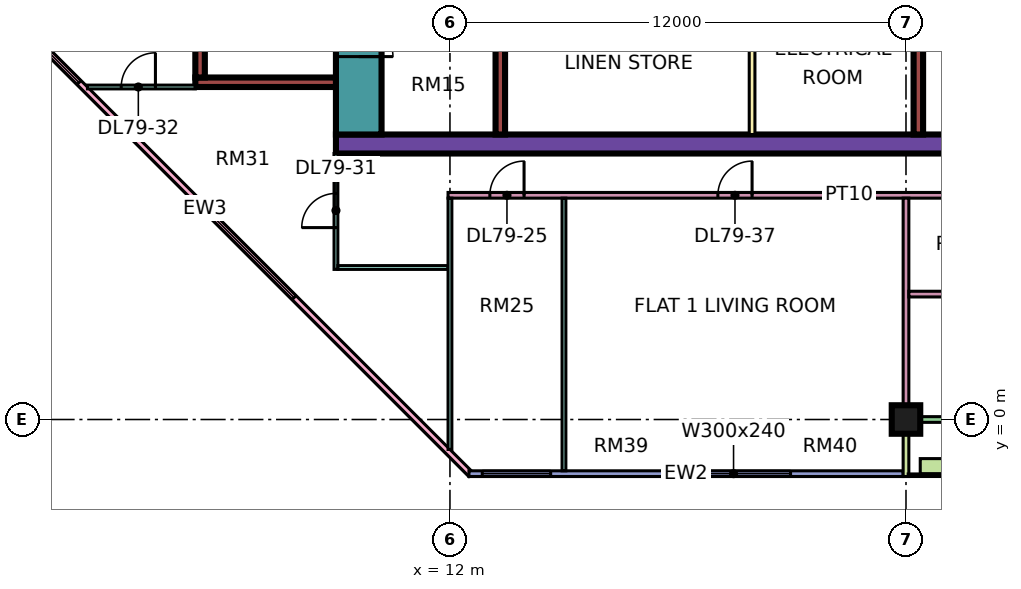
"""IFC4 building model, lengths in metres.
Left out: names, types, materials, properties, quantities, classifications, styles, units other than length and angle.
Written with IfcOpenShell. Run it as: python <this file> out.ifc"""

import sys

from ifc_helpers import new_model, si_unit, direction, frame, frame_2d, origin, origin_2d, place, context, subcontext, project, spatial, rectangle, extrude, element, fill, save


model = new_model("IFC4")
c1 = context("Model", 3, precision=1e-05, world=origin(), true_north=direction((0.0, 1.0)))
c2 = subcontext(c1, "Body", "Model", "MODEL_VIEW")
j1 = project(units=[si_unit("LENGTHUNIT", "METRE"), si_unit("PLANEANGLEUNIT", "RADIAN")], contexts=[c1])
p1 = place(None, origin())
s1 = spatial("IfcSite", under=j1, at=p1, CompositionType="ELEMENT")
p2 = place(p1, origin())
s2 = spatial("IfcBuilding", under=s1, at=p2, CompositionType="ELEMENT")
p3 = place(p2, frame((0.0, 0.0, 342.65)))
s3 = spatial("IfcBuildingStorey", under=s2, at=p3, CompositionType="ELEMENT", Elevation=342.65)
p4 = place(p3, frame((24.0, 0.0, 0.0), z_axis=(0.0, 0.0, 1.0), x_axis=(1.0, 0.0, 0.0)))
e1 = element("IfcColumn", 1, at=p4, inside=s3, PredefinedType="COLUMN", context=c2, shape_type="SweptSolid", body=[
    extrude(rectangle(XDim=0.75, YDim=0.75, at=origin_2d()), origin(), (0.0, 0.0, 1.0), 3.75),
])
p5 = place(p3, frame((9.0, 7.25, 0.0), z_axis=(0.0, 0.0, 1.0), x_axis=(1.0, 0.0, 0.0)))
e2 = element("IfcWall", 2, at=p5, inside=s3, PredefinedType="SHEAR", context=c2, shape_type="SweptSolid", body=[
    extrude(rectangle(XDim=25.0, YDim=0.5, at=frame_2d((12.5, 0.0))), origin(), (0.0, 0.0, 1.0), 3.75),
])
p6 = place(p3, frame((9.6, 7.5, 0.0), z_axis=(0.0, 0.0, 1.0), x_axis=(0.0, 1.0, 0.0)))
e3 = element("IfcWall", 3, at=p6, inside=s3, PredefinedType="SHEAR", context=c2, shape_type="SweptSolid", body=[
    extrude(rectangle(XDim=12.0, YDim=1.2, at=frame_2d((6.0, 0.0))), origin(), (0.0, 0.0, 1.0), 3.75),
])
p7 = place(p6, frame((4.375, 0.0, 0.0)))
e4 = element("IfcOpeningElement", 4, at=p7, cuts=e3, PredefinedType="OPENING", context=c2, shape_type="SweptSolid", body=[
    extrude(rectangle(XDim=1.1, YDim=2.2, at=frame_2d((0.55, 1.1))), frame((0.0, 0.61, 0.0), z_axis=(0.0, -1.0, 0.0), x_axis=(1.0, 0.0, 0.0)), (0.0, 0.0, 1.0), 1.22),
])
p8 = place(p6, frame((6.875, 0.0, 0.0)))
e5 = element("IfcOpeningElement", 5, at=p8, cuts=e3, PredefinedType="OPENING", context=c2, shape_type="SweptSolid", body=[
    extrude(rectangle(XDim=1.1, YDim=2.2, at=frame_2d((0.55, 1.1))), frame((0.0, 0.61, 0.0), z_axis=(0.0, -1.0, 0.0), x_axis=(1.0, 0.0, 0.0)), (0.0, 0.0, 1.0), 1.22),
])
p9 = place(p6, frame((9.85, 0.0, 0.0)))
e6 = element("IfcOpeningElement", 6, at=p9, cuts=e3, PredefinedType="OPENING", context=c2, shape_type="SweptSolid", body=[
    extrude(rectangle(XDim=1.1, YDim=2.2, at=frame_2d((0.55, 1.1))), frame((0.0, 0.61, 0.0), z_axis=(0.0, -1.0, 0.0), x_axis=(1.0, 0.0, 0.0)), (0.0, 0.0, 1.0), 1.22),
])
p10 = place(p6, frame((2.05, 0.0, 0.0)))
e7 = element("IfcOpeningElement", 7, at=p10, cuts=e3, PredefinedType="OPENING", context=c2, shape_type="SweptSolid", body=[
    extrude(rectangle(XDim=0.9, YDim=2.1, at=frame_2d((0.45, 1.05))), frame((0.0, 0.61, 0.0), z_axis=(0.0, -1.0, 0.0), x_axis=(1.0, 0.0, 0.0)), (0.0, 0.0, 1.0), 1.22),
])
p11 = place(p3, frame((13.325, 7.5, 0.0), z_axis=(0.0, 0.0, 1.0), x_axis=(0.0, 1.0, 0.0)))
e8 = element("IfcWall", 8, at=p11, inside=s3, PredefinedType="SHEAR", context=c2, shape_type="SweptSolid", body=[
    extrude(rectangle(XDim=12.0, YDim=0.25, at=frame_2d((6.0, 0.0))), origin(), (0.0, 0.0, 1.0), 3.75),
])
for number, where, z_axis, x_axis in (
    (9, (24.325, 7.5, 0.0), (0.0, 0.0, 1.0), (0.0, 1.0, 0.0)),
    (10, (5.3, 8.875, 0.0), (0.0, 0.0, 1.0), (1.0, 0.0, 0.0)),
):
    element("IfcWall", number, at=place(p3, frame(where, z_axis=z_axis, x_axis=x_axis)), inside=s3, PredefinedType="SHEAR", context=c2, shape_type="SweptSolid", body=[
        extrude(rectangle(XDim=3.7, YDim=0.25, at=frame_2d((1.85, 0.0))), origin(), (0.0, 0.0, 1.0), 3.75),
    ])
p12 = place(p3, frame((5.425, 9.0, 0.0), z_axis=(0.0, 0.0, 1.0), x_axis=(0.0, 1.0, 0.0)))
e11 = element("IfcWall", 11, at=p12, inside=s3, PredefinedType="SHEAR", context=c2, shape_type="SweptSolid", body=[
    extrude(rectangle(XDim=4.0, YDim=0.25, at=frame_2d((2.0, 0.0))), origin(), (0.0, 0.0, 1.0), 3.75),
])
p13 = place(p3, frame((-1.447, 12.553, 0.0), z_axis=(0.0, 0.0, 1.0), x_axis=(0.707106781187, -0.707106781187, 0.0)))
e12 = element("IfcWall", 12, at=p13, inside=s3, PredefinedType="SOLIDWALL", context=c2, shape_type="SweptSolid", body=[
    extrude(rectangle(XDim=19.799, YDim=0.15, at=frame_2d((9.899, 0.0))), origin(), (0.0, 0.0, 1.0), 3.35),
])
p14 = place(p13, frame((2.212, 0.0, 0.45)))
e13 = element("IfcOpeningElement", 13, at=p14, cuts=e12, PredefinedType="OPENING", context=c2, shape_type="SweptSolid", body=[
    extrude(rectangle(XDim=3.0, YDim=2.4, at=frame_2d((1.5, 1.2))), frame((0.0, 0.085, 0.0), z_axis=(0.0, -1.0, 0.0), x_axis=(1.0, 0.0, 0.0)), (0.0, 0.0, 1.0), 0.17),
])
p15 = place(p13, frame((10.216, 0.0, 0.45)))
e14 = element("IfcOpeningElement", 14, at=p15, cuts=e12, PredefinedType="OPENING", context=c2, shape_type="SweptSolid", body=[
    extrude(rectangle(XDim=3.0, YDim=2.4, at=frame_2d((1.5, 1.2))), frame((0.0, 0.085, 0.0), z_axis=(0.0, -1.0, 0.0), x_axis=(1.0, 0.0, 0.0)), (0.0, 0.0, 1.0), 0.17),
])
p16 = place(p3, frame((12.5, -1.425, 0.0), z_axis=(0.0, 0.0, 1.0), x_axis=(1.0, 0.0, 0.0)))
e15 = element("IfcWall", 15, at=p16, inside=s3, PredefinedType="SOLIDWALL", context=c2, shape_type="SweptSolid", body=[
    extrude(rectangle(XDim=11.425, YDim=0.15, at=frame_2d((5.712, 0.0))), origin(), (0.0, 0.0, 1.0), 3.35),
])
p17 = place(p16, frame((0.35, 0.0, 0.45)))
e16 = element("IfcOpeningElement", 16, at=p17, cuts=e15, PredefinedType="OPENING", context=c2, shape_type="SweptSolid", body=[
    extrude(rectangle(XDim=1.8, YDim=2.4, at=frame_2d((0.9, 1.2))), frame((0.0, 0.085, 0.0), z_axis=(0.0, -1.0, 0.0), x_axis=(1.0, 0.0, 0.0)), (0.0, 0.0, 1.0), 0.17),
])
p18 = place(p16, frame((5.462, 0.0, 0.45)))
e17 = element("IfcOpeningElement", 17, at=p18, cuts=e15, PredefinedType="OPENING", context=c2, shape_type="SweptSolid", body=[
    extrude(rectangle(XDim=3.0, YDim=2.4, at=frame_2d((1.5, 1.2))), frame((0.0, 0.085, 0.0), z_axis=(0.0, -1.0, 0.0), x_axis=(1.0, 0.0, 0.0)), (0.0, 0.0, 1.0), 0.17),
])
p19 = place(p3, frame((24.075, 0.0, 0.0), z_axis=(0.0, 0.0, 1.0), x_axis=(1.0, 0.0, 0.0)))
e18 = element("IfcWall", 18, at=p19, inside=s3, PredefinedType="SOLIDWALL", context=c2, shape_type="SweptSolid", body=[
    extrude(rectangle(XDim=11.85, YDim=0.15, at=frame_2d((5.925, 0.0))), origin(), (0.0, 0.0, 1.0), 3.35),
])
p20 = place(p19, frame((2.262, 0.0, 0.0)))
e19 = element("IfcOpeningElement", 19, at=p20, cuts=e18, PredefinedType="OPENING", context=c2, shape_type="SweptSolid", body=[
    extrude(rectangle(XDim=1.8, YDim=2.4, at=frame_2d((0.9, 1.2))), frame((0.0, 0.085, 0.0), z_axis=(0.0, -1.0, 0.0), x_axis=(1.0, 0.0, 0.0)), (0.0, 0.0, 1.0), 0.17),
])
p21 = place(p19, frame((6.525, 0.0, 0.45)))
e20 = element("IfcOpeningElement", 20, at=p21, cuts=e18, PredefinedType="OPENING", context=c2, shape_type="SweptSolid", body=[
    extrude(rectangle(XDim=1.8, YDim=2.4, at=frame_2d((0.9, 1.2))), frame((0.0, 0.085, 0.0), z_axis=(0.0, -1.0, 0.0), x_axis=(1.0, 0.0, 0.0)), (0.0, 0.0, 1.0), 0.17),
])
p22 = place(p19, frame((9.288, 0.0, 0.45)))
e21 = element("IfcOpeningElement", 21, at=p22, cuts=e18, PredefinedType="OPENING", context=c2, shape_type="SweptSolid", body=[
    extrude(rectangle(XDim=1.8, YDim=2.4, at=frame_2d((0.9, 1.2))), frame((0.0, 0.085, 0.0), z_axis=(0.0, -1.0, 0.0), x_axis=(1.0, 0.0, 0.0)), (0.0, 0.0, 1.0), 0.17),
])
p23 = place(p3, frame((24.0, -1.5, 0.0), z_axis=(0.0, 0.0, 1.0), x_axis=(0.0, 1.0, 0.0)))
e22 = element("IfcWall", 22, at=p23, inside=s3, PredefinedType="SOLIDWALL", context=c2, shape_type="SweptSolid", body=[
    extrude(rectangle(XDim=1.5, YDim=0.15, at=frame_2d((0.75, 0.0))), origin(), (0.0, 0.0, 1.0), 3.35),
])
p24 = place(p3, frame((24.375, -1.229, 0.0), z_axis=(0.0, 0.0, 1.0), x_axis=(1.0, 0.0, 0.0)))
e23 = element("IfcWall", 23, at=p24, inside=s3, PredefinedType="SOLIDWALL", context=c2, shape_type="SweptSolid", body=[
    extrude(rectangle(XDim=11.25, YDim=0.4, at=frame_2d((5.625, 0.0))), origin(), (0.0, 0.0, 1.0), 0.7),
])
p25 = place(p3, frame((19.95, 7.5, 0.0), z_axis=(0.0, 0.0, 1.0), x_axis=(0.0, 1.0, 0.0)))
e24 = element("IfcWall", 24, at=p25, inside=s3, PredefinedType="PARTITIONING", context=c2, shape_type="SweptSolid", body=[
    extrude(rectangle(XDim=3.7, YDim=0.15, at=frame_2d((1.85, 0.0))), origin(), (0.0, 0.0, 1.0), 3.35),
])
p26 = place(p3, frame((2.461, 8.75, 0.0), z_axis=(0.0, 0.0, 1.0), x_axis=(1.0, 0.0, 0.0)))
e25 = element("IfcWall", 25, at=p26, inside=s3, PredefinedType="PARTITIONING", context=c2, shape_type="SweptSolid", body=[
    extrude(rectangle(XDim=2.839, YDim=0.1, at=frame_2d((1.419, 0.0))), origin(), (0.0, 0.0, 1.0), 3.35),
])
p27 = place(p26, frame((0.889, 0.0, 0.0)))
e26 = element("IfcOpeningElement", 26, at=p27, cuts=e25, PredefinedType="OPENING", context=c2, shape_type="SweptSolid", body=[
    extrude(rectangle(XDim=0.9, YDim=2.1, at=frame_2d((0.45, 1.05))), frame((0.0, 0.06, 0.0), z_axis=(0.0, -1.0, 0.0), x_axis=(1.0, 0.0, 0.0)), (0.0, 0.0, 1.0), 0.12),
])
p28 = place(p3, frame((9.0, 3.95, 0.0), z_axis=(0.0, 0.0, 1.0), x_axis=(0.0, 1.0, 0.0)))
e27 = element("IfcWall", 27, at=p28, inside=s3, PredefinedType="PARTITIONING", context=c2, shape_type="SweptSolid", body=[
    extrude(rectangle(XDim=3.05, YDim=0.1, at=frame_2d((1.525, 0.0))), origin(), (0.0, 0.0, 1.0), 3.35),
])
p29 = place(p28, frame((1.1, 0.0, 0.0)))
e28 = element("IfcOpeningElement", 28, at=p29, cuts=e27, PredefinedType="OPENING", context=c2, shape_type="SweptSolid", body=[
    extrude(rectangle(XDim=0.9, YDim=2.1, at=frame_2d((0.45, 1.05))), frame((0.0, 0.06, 0.0), z_axis=(0.0, -1.0, 0.0), x_axis=(1.0, 0.0, 0.0)), (0.0, 0.0, 1.0), 0.12),
])
p30 = place(p3, frame((9.05, 4.0, 0.0), z_axis=(0.0, 0.0, 1.0), x_axis=(1.0, 0.0, 0.0)))
e29 = element("IfcWall", 29, at=p30, inside=s3, PredefinedType="PARTITIONING", context=c2, shape_type="SweptSolid", body=[
    extrude(rectangle(XDim=2.9, YDim=0.1, at=frame_2d((1.45, 0.0))), origin(), (0.0, 0.0, 1.0), 3.35),
])
p31 = place(p3, frame((11.95, 5.9, 0.0), z_axis=(0.0, 0.0, 1.0), x_axis=(1.0, 0.0, 0.0)))
e30 = element("IfcWall", 30, at=p31, inside=s3, PredefinedType="PARTITIONING", context=c2, shape_type="SweptSolid", body=[
    extrude(rectangle(XDim=21.1, YDim=0.15, at=frame_2d((10.55, 0.0))), origin(), (0.0, 0.0, 1.0), 3.35),
])
p32 = place(p31, frame((1.1, 0.0, 0.0)))
e31 = element("IfcOpeningElement", 31, at=p32, cuts=e30, PredefinedType="OPENING", context=c2, shape_type="SweptSolid", body=[
    extrude(rectangle(XDim=0.9, YDim=2.1, at=frame_2d((0.45, 1.05))), frame((0.0, 0.085, 0.0), z_axis=(0.0, -1.0, 0.0), x_axis=(1.0, 0.0, 0.0)), (0.0, 0.0, 1.0), 0.17),
])
p33 = place(p31, frame((16.1, 0.0, 0.0)))
e32 = element("IfcOpeningElement", 32, at=p33, cuts=e30, PredefinedType="OPENING", context=c2, shape_type="SweptSolid", body=[
    extrude(rectangle(XDim=0.9, YDim=2.1, at=frame_2d((0.45, 1.05))), frame((0.0, 0.085, 0.0), z_axis=(0.0, -1.0, 0.0), x_axis=(1.0, 0.0, 0.0)), (0.0, 0.0, 1.0), 0.17),
])
p34 = place(p31, frame((7.1, 0.0, 0.0)))
e33 = element("IfcOpeningElement", 33, at=p34, cuts=e30, PredefinedType="OPENING", context=c2, shape_type="SweptSolid", body=[
    extrude(rectangle(XDim=0.9, YDim=2.1, at=frame_2d((0.45, 1.05))), frame((0.0, 0.085, 0.0), z_axis=(0.0, -1.0, 0.0), x_axis=(1.0, 0.0, 0.0)), (0.0, 0.0, 1.0), 0.17),
])
p35 = place(p3, frame((12.0, -0.788, 0.0), z_axis=(0.0, 0.0, 1.0), x_axis=(0.0, 1.0, 0.0)))
e34 = element("IfcWall", 34, at=p35, inside=s3, PredefinedType="PARTITIONING", context=c2, shape_type="SweptSolid", body=[
    extrude(rectangle(XDim=6.613, YDim=0.1, at=frame_2d((3.306, 0.0))), origin(), (0.0, 0.0, 1.0), 3.35),
])
p36 = place(p3, frame((15.0, -1.35, 0.0), z_axis=(0.0, 0.0, 1.0), x_axis=(0.0, 1.0, 0.0)))
e35 = element("IfcWall", 35, at=p36, inside=s3, PredefinedType="PARTITIONING", context=c2, shape_type="SweptSolid", body=[
    extrude(rectangle(XDim=7.175, YDim=0.1, at=frame_2d((3.587, 0.0))), origin(), (0.0, 0.0, 1.0), 3.35),
])
p37 = place(p3, frame((24.0, 0.0, 0.0), z_axis=(0.0, 0.0, 1.0), x_axis=(0.0, 1.0, 0.0)))
e36 = element("IfcWall", 36, at=p37, inside=s3, PredefinedType="PARTITIONING", context=c2, shape_type="SweptSolid", body=[
    extrude(rectangle(XDim=5.825, YDim=0.15, at=frame_2d((2.913, 0.0))), origin(), (0.0, 0.0, 1.0), 3.35),
])
p38 = place(p3, frame((24.075, 3.3, 0.0), z_axis=(0.0, 0.0, 1.0), x_axis=(1.0, 0.0, 0.0)))
e37 = element("IfcWall", 37, at=p38, inside=s3, PredefinedType="PARTITIONING", context=c2, shape_type="SweptSolid", body=[
    extrude(rectangle(XDim=3.0, YDim=0.15, at=frame_2d((1.5, 0.0))), origin(), (0.0, 0.0, 1.0), 3.35),
])
p39 = place(p14, origin())
e38 = element("IfcWindow", 38, at=p39, inside=s3, PartitioningType="SINGLE_PANEL", PredefinedType="WINDOW", context=c2, shape_type="SweptSolid", body=[
    extrude(rectangle(XDim=3.0, YDim=2.4, at=frame_2d((1.5, 1.2))), frame((0.0, 0.03, 0.0), z_axis=(0.0, -1.0, 0.0), x_axis=(1.0, 0.0, 0.0)), (0.0, 0.0, 1.0), 0.06),
])
fill(e13, e38)
p40 = place(p15, origin())
e39 = element("IfcWindow", 39, at=p40, inside=s3, PartitioningType="SINGLE_PANEL", PredefinedType="WINDOW", context=c2, shape_type="SweptSolid", body=[
    extrude(rectangle(XDim=3.0, YDim=2.4, at=frame_2d((1.5, 1.2))), frame((0.0, 0.03, 0.0), z_axis=(0.0, -1.0, 0.0), x_axis=(1.0, 0.0, 0.0)), (0.0, 0.0, 1.0), 0.06),
])
fill(e14, e39)
p41 = place(p17, origin())
e40 = element("IfcWindow", 40, at=p41, inside=s3, PartitioningType="SINGLE_PANEL", PredefinedType="WINDOW", context=c2, shape_type="SweptSolid", body=[
    extrude(rectangle(XDim=1.8, YDim=2.4, at=frame_2d((0.9, 1.2))), frame((0.0, 0.03, 0.0), z_axis=(0.0, -1.0, 0.0), x_axis=(1.0, 0.0, 0.0)), (0.0, 0.0, 1.0), 0.06),
])
fill(e16, e40)
p42 = place(p18, origin())
e41 = element("IfcWindow", 41, at=p42, inside=s3, PartitioningType="SINGLE_PANEL", PredefinedType="WINDOW", context=c2, shape_type="SweptSolid", body=[
    extrude(rectangle(XDim=3.0, YDim=2.4, at=frame_2d((1.5, 1.2))), frame((0.0, 0.03, 0.0), z_axis=(0.0, -1.0, 0.0), x_axis=(1.0, 0.0, 0.0)), (0.0, 0.0, 1.0), 0.06),
])
fill(e17, e41)
p43 = place(p10, frame((0.9, 0.0, 0.0), z_axis=(0.0, 0.0, 1.0), x_axis=(-1.0, 0.0, 0.0)))
e42 = element("IfcDoor", 42, at=p43, inside=s3, OperationType="SINGLE_SWING_LEFT", PredefinedType="DOOR", context=c2, shape_type="SweptSolid", body=[
    extrude(rectangle(XDim=0.9, YDim=2.1, at=frame_2d((0.45, 1.05))), frame((0.0, 0.025, 0.0), z_axis=(0.0, -1.0, 0.0), x_axis=(1.0, 0.0, 0.0)), (0.0, 0.0, 1.0), 0.05),
])
fill(e7, e42)
p44 = place(p32, frame((0.9, 0.0, 0.0), z_axis=(0.0, 0.0, 1.0), x_axis=(-1.0, 0.0, 0.0)))
e43 = element("IfcDoor", 43, at=p44, inside=s3, OperationType="SINGLE_SWING_RIGHT", PredefinedType="DOOR", context=c2, shape_type="SweptSolid", body=[
    extrude(rectangle(XDim=0.9, YDim=2.1, at=frame_2d((0.45, 1.05))), frame((0.0, 0.025, 0.0), z_axis=(0.0, -1.0, 0.0), x_axis=(1.0, 0.0, 0.0)), (0.0, 0.0, 1.0), 0.05),
])
fill(e31, e43)
p45 = place(p29, origin())
e44 = element("IfcDoor", 44, at=p45, inside=s3, OperationType="SINGLE_SWING_LEFT", PredefinedType="DOOR", context=c2, shape_type="SweptSolid", body=[
    extrude(rectangle(XDim=0.9, YDim=2.1, at=frame_2d((0.45, 1.05))), frame((0.0, 0.025, 0.0), z_axis=(0.0, -1.0, 0.0), x_axis=(1.0, 0.0, 0.0)), (0.0, 0.0, 1.0), 0.05),
])
fill(e28, e44)
p46 = place(p27, frame((0.9, 0.0, 0.0), z_axis=(0.0, 0.0, 1.0), x_axis=(-1.0, 0.0, 0.0)))
e45 = element("IfcDoor", 45, at=p46, inside=s3, OperationType="SINGLE_SWING_RIGHT", PredefinedType="DOOR", context=c2, shape_type="SweptSolid", body=[
    extrude(rectangle(XDim=0.9, YDim=2.1, at=frame_2d((0.45, 1.05))), frame((0.0, 0.025, 0.0), z_axis=(0.0, -1.0, 0.0), x_axis=(1.0, 0.0, 0.0)), (0.0, 0.0, 1.0), 0.05),
])
fill(e26, e45)
p47 = place(p34, frame((0.9, 0.0, 0.0), z_axis=(0.0, 0.0, 1.0), x_axis=(-1.0, 0.0, 0.0)))
e46 = element("IfcDoor", 46, at=p47, inside=s3, OperationType="SINGLE_SWING_RIGHT", PredefinedType="DOOR", context=c2, shape_type="SweptSolid", body=[
    extrude(rectangle(XDim=0.9, YDim=2.1, at=frame_2d((0.45, 1.05))), frame((0.0, 0.025, 0.0), z_axis=(0.0, -1.0, 0.0), x_axis=(1.0, 0.0, 0.0)), (0.0, 0.0, 1.0), 0.05),
])
fill(e33, e46)
save(model, sys.argv[1])
